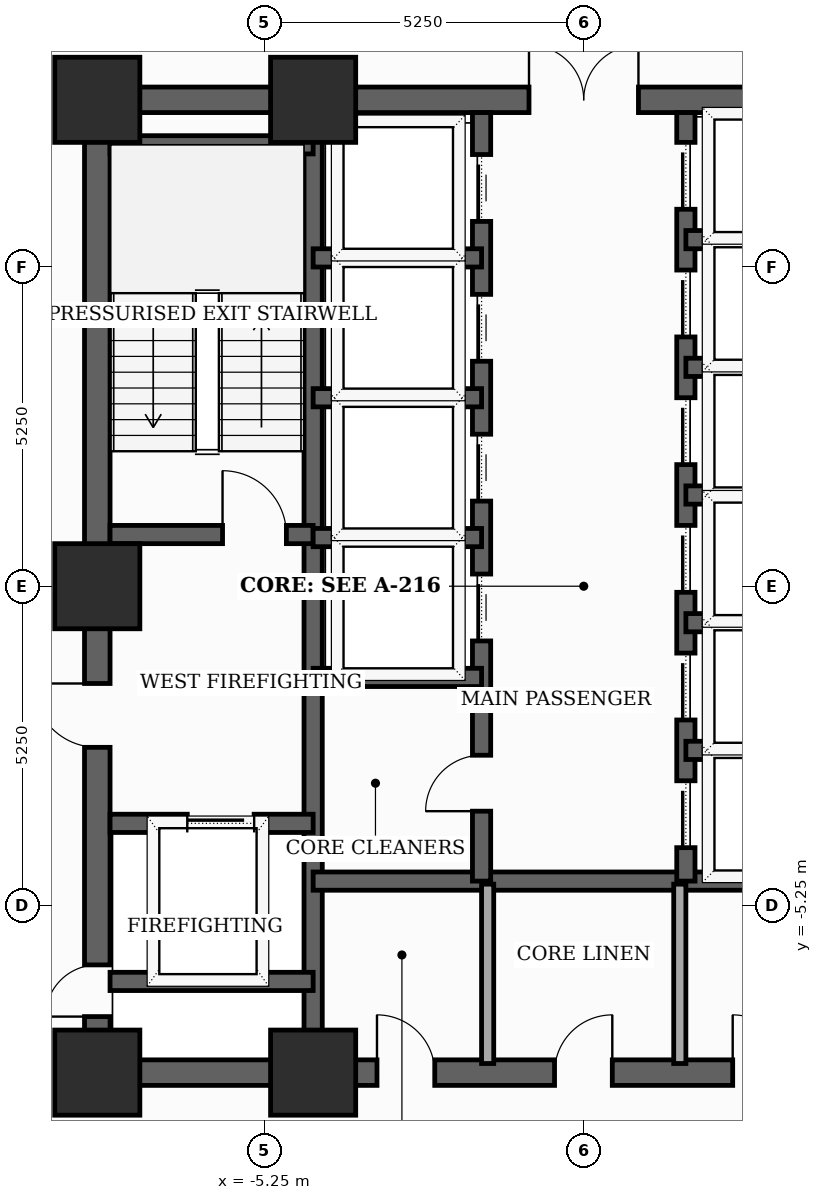
"""IFC4 building model, lengths in metres.
Left out: names, types, materials, properties, quantities, classifications, styles, units other than length and angle.
Written with IfcOpenShell. Run it as: python <this file> out.ifc"""

import sys

from ifc_helpers import new_model, si_unit, direction, frame, frame_2d, origin, origin_2d, place, context, subcontext, project, spatial, rectangle, extrude, element, fill, save


model = new_model("IFC4")
c1 = context("Model", 3, precision=1e-05, world=origin(), true_north=direction((0.0, 1.0)))
c2 = subcontext(c1, "Body", "Model", "MODEL_VIEW")
j1 = project(units=[si_unit("LENGTHUNIT", "METRE"), si_unit("PLANEANGLEUNIT", "RADIAN")], contexts=[c1])
p1 = place(None, origin())
s1 = spatial("IfcSite", under=j1, at=p1, CompositionType="ELEMENT")
p2 = place(p1, origin())
s2 = spatial("IfcBuilding", under=s1, at=p2, CompositionType="ELEMENT")
p3 = place(p2, frame((0.0, 0.0, 105.1)))
s3 = spatial("IfcBuildingStorey", under=s2, at=p3, CompositionType="ELEMENT", Elevation=105.1)
for number, where, z_axis, x_axis in (
    (1, (-8.0, -8.0, 0.0), (0.0, 0.0, 1.0), (1.0, 0.0, 0.0)),
    (2, (-4.45, -8.0, 0.0), (0.0, 0.0, 1.0), (1.0, 0.0, 0.0)),
    (3, (-4.45, 8.0, 0.0), (0.0, 0.0, 1.0), (1.0, 0.0, 0.0)),
    (4, (-8.0, 8.0, 0.0), (0.0, 0.0, 1.0), (1.0, 0.0, 0.0)),
    (5, (-8.0, 0.0, 0.0), (0.0, 0.0, 1.0), (1.0, 0.0, 0.0)),
):
    element("IfcColumn", number, at=place(p3, frame(where, z_axis=z_axis, x_axis=x_axis)), inside=s3, PredefinedType="COLUMN", context=c2, shape_type="SweptSolid", body=[
        extrude(rectangle(XDim=1.4, YDim=1.4, at=origin_2d()), origin(), (0.0, 0.0, 1.0), 3.7),
    ])
p4 = place(p3, frame((-8.0, -8.0, 0.0), z_axis=(0.0, 0.0, 1.0), x_axis=(0.0, 1.0, 0.0)))
e6 = element("IfcWall", 6, at=p4, inside=s3, PredefinedType="SHEAR", context=c2, shape_type="SweptSolid", body=[
    extrude(rectangle(XDim=16.0, YDim=0.42, at=frame_2d((8.0, 0.0))), origin(), (0.0, 0.0, 1.0), 3.5),
])
p5 = place(p4, frame((0.922, 0.0, 0.0)))
e7 = element("IfcOpeningElement", 7, at=p5, cuts=e6, PredefinedType="OPENING", context=c2, shape_type="SweptSolid", body=[
    extrude(rectangle(XDim=0.85, YDim=2.02, at=frame_2d((0.425, 1.01))), frame((0.0, 0.22, 0.0), z_axis=(0.0, -1.0, 0.0), x_axis=(1.0, 0.0, 0.0)), (0.0, 0.0, 1.0), 0.44),
])
p6 = place(p4, frame((5.35, 0.0, 0.0)))
e8 = element("IfcOpeningElement", 8, at=p6, cuts=e6, PredefinedType="OPENING", context=c2, shape_type="SweptSolid", body=[
    extrude(rectangle(XDim=1.05, YDim=2.15, at=frame_2d((0.525, 1.075))), frame((0.0, 0.22, 0.0), z_axis=(0.0, -1.0, 0.0), x_axis=(1.0, 0.0, 0.0)), (0.0, 0.0, 1.0), 0.44),
])
p7 = place(p3, frame((-8.0, -8.0, 0.0), z_axis=(0.0, 0.0, 1.0), x_axis=(1.0, 0.0, 0.0)))
e9 = element("IfcWall", 9, at=p7, inside=s3, PredefinedType="SHEAR", context=c2, shape_type="SweptSolid", body=[
    extrude(rectangle(XDim=16.0, YDim=0.42, at=frame_2d((8.0, 0.0))), origin(), (0.0, 0.0, 1.0), 3.5),
])
p8 = place(p7, frame((4.6, 0.0, 0.0)))
e10 = element("IfcOpeningElement", 10, at=p8, cuts=e9, PredefinedType="OPENING", context=c2, shape_type="SweptSolid", body=[
    extrude(rectangle(XDim=0.95, YDim=2.1, at=frame_2d((0.475, 1.05))), frame((0.0, 0.22, 0.0), z_axis=(0.0, -1.0, 0.0), x_axis=(1.0, 0.0, 0.0)), (0.0, 0.0, 1.0), 0.44),
])
p9 = place(p7, frame((7.52, 0.0, 0.0)))
e11 = element("IfcOpeningElement", 11, at=p9, cuts=e9, PredefinedType="OPENING", context=c2, shape_type="SweptSolid", body=[
    extrude(rectangle(XDim=0.95, YDim=2.1, at=frame_2d((0.475, 1.05))), frame((0.0, 0.22, 0.0), z_axis=(0.0, -1.0, 0.0), x_axis=(1.0, 0.0, 0.0)), (0.0, 0.0, 1.0), 0.44),
])
p10 = place(p7, frame((10.45, 0.0, 0.0)))
e12 = element("IfcOpeningElement", 12, at=p10, cuts=e9, PredefinedType="OPENING", context=c2, shape_type="SweptSolid", body=[
    extrude(rectangle(XDim=0.95, YDim=2.1, at=frame_2d((0.475, 1.05))), frame((0.0, 0.22, 0.0), z_axis=(0.0, -1.0, 0.0), x_axis=(1.0, 0.0, 0.0)), (0.0, 0.0, 1.0), 0.44),
])
p11 = place(p3, frame((-8.0, 8.0, 0.0), z_axis=(0.0, 0.0, 1.0), x_axis=(1.0, 0.0, 0.0)))
e13 = element("IfcWall", 13, at=p11, inside=s3, PredefinedType="SHEAR", context=c2, shape_type="SweptSolid", body=[
    extrude(rectangle(XDim=16.0, YDim=0.42, at=frame_2d((8.0, 0.0))), origin(), (0.0, 0.0, 1.0), 3.5),
])
p12 = place(p11, frame((7.1, 0.0, 0.0)))
e14 = element("IfcOpeningElement", 14, at=p12, cuts=e13, PredefinedType="OPENING", context=c2, shape_type="SweptSolid", body=[
    extrude(rectangle(XDim=1.8, YDim=2.15, at=frame_2d((0.9, 1.075))), frame((0.0, 0.22, 0.0), z_axis=(0.0, -1.0, 0.0), x_axis=(1.0, 0.0, 0.0)), (0.0, 0.0, 1.0), 0.44),
])
p13 = place(p3, frame((-4.45, -7.79, 0.0), z_axis=(0.0, 0.0, 1.0), x_axis=(0.0, 1.0, 0.0)))
e15 = element("IfcWall", 15, at=p13, inside=s3, PredefinedType="SHEAR", context=c2, shape_type="SweptSolid", body=[
    extrude(rectangle(XDim=15.58, YDim=0.3, at=frame_2d((7.79, 0.0))), origin(), (0.0, 0.0, 1.0), 3.5),
])
p14 = place(p3, frame((-7.79, 0.85, 0.0), z_axis=(0.0, 0.0, 1.0), x_axis=(1.0, 0.0, 0.0)))
e16 = element("IfcWall", 16, at=p14, inside=s3, PredefinedType="SHEAR", context=c2, shape_type="SweptSolid", body=[
    extrude(rectangle(XDim=3.34, YDim=0.3, at=frame_2d((1.67, 0.0))), origin(), (0.0, 0.0, 1.0), 3.5),
])
p15 = place(p14, frame((1.85, 0.0, 0.0)))
e17 = element("IfcOpeningElement", 17, at=p15, cuts=e16, PredefinedType="OPENING", context=c2, shape_type="SweptSolid", body=[
    extrude(rectangle(XDim=1.05, YDim=2.15, at=frame_2d((0.525, 1.075))), frame((0.0, 0.16, 0.0), z_axis=(0.0, -1.0, 0.0), x_axis=(1.0, 0.0, 0.0)), (0.0, 0.0, 1.0), 0.32),
])
p16 = place(p3, frame((-7.79, 7.26, 0.0), z_axis=(0.0, 0.0, 1.0), x_axis=(1.0, 0.0, 0.0)))
e18 = element("IfcWall", 18, at=p16, inside=s3, PredefinedType="SHEAR", context=c2, shape_type="SweptSolid", body=[
    extrude(rectangle(XDim=3.34, YDim=0.3, at=frame_2d((1.67, 0.0))), origin(), (0.0, 0.0, 1.0), 3.5),
])
p17 = place(p3, frame((-7.79, -3.9, 0.0), z_axis=(0.0, 0.0, 1.0), x_axis=(1.0, 0.0, 0.0)))
e19 = element("IfcWall", 19, at=p17, inside=s3, PredefinedType="SHEAR", context=c2, shape_type="SweptSolid", body=[
    extrude(rectangle(XDim=3.34, YDim=0.3, at=frame_2d((1.67, 0.0))), origin(), (0.0, 0.0, 1.0), 3.5),
])
p18 = place(p17, frame((1.27, 0.0, 0.0)))
e20 = element("IfcOpeningElement", 20, at=p18, cuts=e19, PredefinedType="OPENING", context=c2, shape_type="SweptSolid", body=[
    extrude(rectangle(XDim=1.1, YDim=2.1, at=frame_2d((0.55, 1.05))), frame((0.0, 0.16, 0.0), z_axis=(0.0, -1.0, 0.0), x_axis=(1.0, 0.0, 0.0)), (0.0, 0.0, 1.0), 0.32),
])
p19 = place(p3, frame((-7.79, -6.5, 0.0), z_axis=(0.0, 0.0, 1.0), x_axis=(1.0, 0.0, 0.0)))
e21 = element("IfcWall", 21, at=p19, inside=s3, PredefinedType="SHEAR", context=c2, shape_type="SweptSolid", body=[
    extrude(rectangle(XDim=3.34, YDim=0.3, at=frame_2d((1.67, 0.0))), origin(), (0.0, 0.0, 1.0), 3.5),
])
p20 = place(p3, frame((-4.45, -4.85, 0.0), z_axis=(0.0, 0.0, 1.0), x_axis=(1.0, 0.0, 0.0)))
e22 = element("IfcWall", 22, at=p20, inside=s3, PredefinedType="SHEAR", context=c2, shape_type="SweptSolid", body=[
    extrude(rectangle(XDim=8.9, YDim=0.3, at=frame_2d((4.45, 0.0))), origin(), (0.0, 0.0, 1.0), 3.5),
])
p21 = place(p3, frame((-1.68, -4.85, 0.0), z_axis=(0.0, 0.0, 1.0), x_axis=(0.0, 1.0, 0.0)))
e23 = element("IfcWall", 23, at=p21, inside=s3, PredefinedType="SHEAR", context=c2, shape_type="SweptSolid", body=[
    extrude(rectangle(XDim=12.64, YDim=0.3, at=frame_2d((6.32, 0.0))), origin(), (0.0, 0.0, 1.0), 3.5),
])
p22 = place(p21, frame((3.95, 0.0, 0.0)))
e24 = element("IfcOpeningElement", 24, at=p22, cuts=e23, PredefinedType="OPENING", context=c2, shape_type="SweptSolid", body=[
    extrude(rectangle(XDim=1.1, YDim=2.1, at=frame_2d((0.55, 1.05))), frame((0.0, 0.16, 0.0), z_axis=(0.0, -1.0, 0.0), x_axis=(1.0, 0.0, 0.0)), (0.0, 0.0, 1.0), 0.32),
])
p23 = place(p21, frame((6.25, 0.0, 0.0)))
e25 = element("IfcOpeningElement", 25, at=p23, cuts=e23, PredefinedType="OPENING", context=c2, shape_type="SweptSolid", body=[
    extrude(rectangle(XDim=1.1, YDim=2.1, at=frame_2d((0.55, 1.05))), frame((0.0, 0.16, 0.0), z_axis=(0.0, -1.0, 0.0), x_axis=(1.0, 0.0, 0.0)), (0.0, 0.0, 1.0), 0.32),
])
p24 = place(p21, frame((8.55, 0.0, 0.0)))
e26 = element("IfcOpeningElement", 26, at=p24, cuts=e23, PredefinedType="OPENING", context=c2, shape_type="SweptSolid", body=[
    extrude(rectangle(XDim=1.1, YDim=2.1, at=frame_2d((0.55, 1.05))), frame((0.0, 0.16, 0.0), z_axis=(0.0, -1.0, 0.0), x_axis=(1.0, 0.0, 0.0)), (0.0, 0.0, 1.0), 0.32),
])
p25 = place(p21, frame((10.85, 0.0, 0.0)))
e27 = element("IfcOpeningElement", 27, at=p25, cuts=e23, PredefinedType="OPENING", context=c2, shape_type="SweptSolid", body=[
    extrude(rectangle(XDim=1.1, YDim=2.1, at=frame_2d((0.55, 1.05))), frame((0.0, 0.16, 0.0), z_axis=(0.0, -1.0, 0.0), x_axis=(1.0, 0.0, 0.0)), (0.0, 0.0, 1.0), 0.32),
])
p26 = place(p21, frame((1.15, 0.0, 0.0)))
e28 = element("IfcOpeningElement", 28, at=p26, cuts=e23, PredefinedType="OPENING", context=c2, shape_type="SweptSolid", body=[
    extrude(rectangle(XDim=0.92, YDim=2.1, at=frame_2d((0.46, 1.05))), frame((0.0, 0.16, 0.0), z_axis=(0.0, -1.0, 0.0), x_axis=(1.0, 0.0, 0.0)), (0.0, 0.0, 1.0), 0.32),
])
p27 = place(p3, frame((1.68, -4.85, 0.0), z_axis=(0.0, 0.0, 1.0), x_axis=(0.0, 1.0, 0.0)))
e29 = element("IfcWall", 29, at=p27, inside=s3, PredefinedType="SHEAR", context=c2, shape_type="SweptSolid", body=[
    extrude(rectangle(XDim=12.64, YDim=0.3, at=frame_2d((6.32, 0.0))), origin(), (0.0, 0.0, 1.0), 3.5),
])
p28 = place(p27, frame((0.55, 0.0, 0.0)))
e30 = element("IfcOpeningElement", 30, at=p28, cuts=e29, PredefinedType="OPENING", context=c2, shape_type="SweptSolid", body=[
    extrude(rectangle(XDim=1.1, YDim=2.1, at=frame_2d((0.55, 1.05))), frame((0.0, 0.16, 0.0), z_axis=(0.0, -1.0, 0.0), x_axis=(1.0, 0.0, 0.0)), (0.0, 0.0, 1.0), 0.32),
])
p29 = place(p27, frame((2.65, 0.0, 0.0)))
e31 = element("IfcOpeningElement", 31, at=p29, cuts=e29, PredefinedType="OPENING", context=c2, shape_type="SweptSolid", body=[
    extrude(rectangle(XDim=1.1, YDim=2.1, at=frame_2d((0.55, 1.05))), frame((0.0, 0.16, 0.0), z_axis=(0.0, -1.0, 0.0), x_axis=(1.0, 0.0, 0.0)), (0.0, 0.0, 1.0), 0.32),
])
p30 = place(p27, frame((4.75, 0.0, 0.0)))
e32 = element("IfcOpeningElement", 32, at=p30, cuts=e29, PredefinedType="OPENING", context=c2, shape_type="SweptSolid", body=[
    extrude(rectangle(XDim=1.1, YDim=2.1, at=frame_2d((0.55, 1.05))), frame((0.0, 0.16, 0.0), z_axis=(0.0, -1.0, 0.0), x_axis=(1.0, 0.0, 0.0)), (0.0, 0.0, 1.0), 0.32),
])
p31 = place(p27, frame((6.85, 0.0, 0.0)))
e33 = element("IfcOpeningElement", 33, at=p31, cuts=e29, PredefinedType="OPENING", context=c2, shape_type="SweptSolid", body=[
    extrude(rectangle(XDim=1.1, YDim=2.1, at=frame_2d((0.55, 1.05))), frame((0.0, 0.16, 0.0), z_axis=(0.0, -1.0, 0.0), x_axis=(1.0, 0.0, 0.0)), (0.0, 0.0, 1.0), 0.32),
])
p32 = place(p27, frame((8.95, 0.0, 0.0)))
e34 = element("IfcOpeningElement", 34, at=p32, cuts=e29, PredefinedType="OPENING", context=c2, shape_type="SweptSolid", body=[
    extrude(rectangle(XDim=1.1, YDim=2.1, at=frame_2d((0.55, 1.05))), frame((0.0, 0.16, 0.0), z_axis=(0.0, -1.0, 0.0), x_axis=(1.0, 0.0, 0.0)), (0.0, 0.0, 1.0), 0.32),
])
p33 = place(p27, frame((11.05, 0.0, 0.0)))
e35 = element("IfcOpeningElement", 35, at=p33, cuts=e29, PredefinedType="OPENING", context=c2, shape_type="SweptSolid", body=[
    extrude(rectangle(XDim=1.1, YDim=2.1, at=frame_2d((0.55, 1.05))), frame((0.0, 0.16, 0.0), z_axis=(0.0, -1.0, 0.0), x_axis=(1.0, 0.0, 0.0)), (0.0, 0.0, 1.0), 0.32),
])
for number, where, z_axis, x_axis in (
    (36, (-4.45, -1.5, 0.0), (0.0, 0.0, 1.0), (1.0, 0.0, 0.0)),
    (37, (-4.45, 0.8, 0.0), (0.0, 0.0, 1.0), (1.0, 0.0, 0.0)),
    (38, (-4.45, 3.1, 0.0), (0.0, 0.0, 1.0), (1.0, 0.0, 0.0)),
    (39, (-4.45, 5.4, 0.0), (0.0, 0.0, 1.0), (1.0, 0.0, 0.0)),
    (40, (1.68, 1.5, 0.0), (0.0, 0.0, 1.0), (1.0, 0.0, 0.0)),
    (41, (1.68, 3.6, 0.0), (0.0, 0.0, 1.0), (1.0, 0.0, 0.0)),
    (42, (1.68, 5.7, 0.0), (0.0, 0.0, 1.0), (1.0, 0.0, 0.0)),
    (43, (1.68, -2.7, 0.0), (0.0, 0.0, 1.0), (1.0, 0.0, 0.0)),
    (44, (1.68, -0.6, 0.0), (0.0, 0.0, 1.0), (1.0, 0.0, 0.0)),
):
    element("IfcWall", number, at=place(p3, frame(where, z_axis=z_axis, x_axis=x_axis)), inside=s3, PredefinedType="SHEAR", context=c2, shape_type="SweptSolid", body=[
        extrude(rectangle(XDim=2.77, YDim=0.3, at=frame_2d((1.385, 0.0))), origin(), (0.0, 0.0, 1.0), 3.5),
    ])
for number, where, z_axis, x_axis in (
    (45, (-1.58, -7.85, 0.0), (0.0, 0.0, 1.0), (0.0, 1.0, 0.0)),
    (46, (1.58, -7.85, 0.0), (0.0, 0.0, 1.0), (0.0, 1.0, 0.0)),
):
    element("IfcWall", number, at=place(p3, frame(where, z_axis=z_axis, x_axis=x_axis)), inside=s3, PredefinedType="SOLIDWALL", context=c2, shape_type="SweptSolid", body=[
        extrude(rectangle(XDim=2.95, YDim=0.2, at=frame_2d((1.475, 0.0))), origin(), (0.0, 0.0, 1.0), 2.885),
    ])
p34 = place(p5, origin())
e47 = element("IfcDoor", 47, at=p34, inside=s3, OperationType="SINGLE_SWING_LEFT", PredefinedType="TRAPDOOR", context=c2, shape_type="SweptSolid", body=[
    extrude(rectangle(XDim=0.85, YDim=2.02, at=frame_2d((0.425, 1.01))), frame((0.0, 0.025, 0.0), z_axis=(0.0, -1.0, 0.0), x_axis=(1.0, 0.0, 0.0)), (0.0, 0.0, 1.0), 0.05),
])
fill(e7, e47)
p35 = place(p6, origin())
e48 = element("IfcDoor", 48, at=p35, inside=s3, OperationType="SINGLE_SWING_RIGHT", PredefinedType="DOOR", context=c2, shape_type="SweptSolid", body=[
    extrude(rectangle(XDim=1.05, YDim=2.15, at=frame_2d((0.525, 1.075))), frame((0.0, 0.025, 0.0), z_axis=(0.0, -1.0, 0.0), x_axis=(1.0, 0.0, 0.0)), (0.0, 0.0, 1.0), 0.05),
])
fill(e8, e48)
p36 = place(p8, origin())
e49 = element("IfcDoor", 49, at=p36, inside=s3, OperationType="SINGLE_SWING_LEFT", PredefinedType="DOOR", context=c2, shape_type="SweptSolid", body=[
    extrude(rectangle(XDim=0.95, YDim=2.1, at=frame_2d((0.475, 1.05))), frame((0.0, 0.025, 0.0), z_axis=(0.0, -1.0, 0.0), x_axis=(1.0, 0.0, 0.0)), (0.0, 0.0, 1.0), 0.05),
])
fill(e10, e49)
p37 = place(p9, origin())
e50 = element("IfcDoor", 50, at=p37, inside=s3, OperationType="SINGLE_SWING_RIGHT", PredefinedType="DOOR", context=c2, shape_type="SweptSolid", body=[
    extrude(rectangle(XDim=0.95, YDim=2.1, at=frame_2d((0.475, 1.05))), frame((0.0, 0.025, 0.0), z_axis=(0.0, -1.0, 0.0), x_axis=(1.0, 0.0, 0.0)), (0.0, 0.0, 1.0), 0.05),
])
fill(e11, e50)
p38 = place(p10, origin())
e51 = element("IfcDoor", 51, at=p38, inside=s3, OperationType="SINGLE_SWING_LEFT", PredefinedType="DOOR", context=c2, shape_type="SweptSolid", body=[
    extrude(rectangle(XDim=0.95, YDim=2.1, at=frame_2d((0.475, 1.05))), frame((0.0, 0.025, 0.0), z_axis=(0.0, -1.0, 0.0), x_axis=(1.0, 0.0, 0.0)), (0.0, 0.0, 1.0), 0.05),
])
fill(e12, e51)
p39 = place(p12, origin())
e52 = element("IfcDoor", 52, at=p39, inside=s3, OperationType="DOUBLE_DOOR_SINGLE_SWING", PredefinedType="DOOR", context=c2, shape_type="SweptSolid", body=[
    extrude(rectangle(XDim=1.8, YDim=2.15, at=frame_2d((0.9, 1.075))), frame((0.0, 0.025, 0.0), z_axis=(0.0, -1.0, 0.0), x_axis=(1.0, 0.0, 0.0)), (0.0, 0.0, 1.0), 0.05),
])
fill(e14, e52)
p40 = place(p15, origin())
e53 = element("IfcDoor", 53, at=p40, inside=s3, OperationType="SINGLE_SWING_LEFT", PredefinedType="DOOR", context=c2, shape_type="SweptSolid", body=[
    extrude(rectangle(XDim=1.05, YDim=2.15, at=frame_2d((0.525, 1.075))), frame((0.0, 0.025, 0.0), z_axis=(0.0, -1.0, 0.0), x_axis=(1.0, 0.0, 0.0)), (0.0, 0.0, 1.0), 0.05),
])
fill(e17, e53)
p41 = place(p18, origin())
e54 = element("IfcDoor", 54, at=p41, inside=s3, OperationType="SLIDING_TO_LEFT", PredefinedType="DOOR", context=c2, shape_type="SweptSolid", body=[
    extrude(rectangle(XDim=1.1, YDim=2.1, at=frame_2d((0.55, 1.05))), frame((0.0, 0.025, 0.0), z_axis=(0.0, -1.0, 0.0), x_axis=(1.0, 0.0, 0.0)), (0.0, 0.0, 1.0), 0.05),
])
fill(e20, e54)
p42 = place(p22, origin())
e55 = element("IfcDoor", 55, at=p42, inside=s3, OperationType="SLIDING_TO_LEFT", PredefinedType="DOOR", context=c2, shape_type="SweptSolid", body=[
    extrude(rectangle(XDim=1.1, YDim=2.1, at=frame_2d((0.55, 1.05))), frame((0.0, 0.025, 0.0), z_axis=(0.0, -1.0, 0.0), x_axis=(1.0, 0.0, 0.0)), (0.0, 0.0, 1.0), 0.05),
])
fill(e24, e55)
p43 = place(p23, origin())
e56 = element("IfcDoor", 56, at=p43, inside=s3, OperationType="SLIDING_TO_LEFT", PredefinedType="DOOR", context=c2, shape_type="SweptSolid", body=[
    extrude(rectangle(XDim=1.1, YDim=2.1, at=frame_2d((0.55, 1.05))), frame((0.0, 0.025, 0.0), z_axis=(0.0, -1.0, 0.0), x_axis=(1.0, 0.0, 0.0)), (0.0, 0.0, 1.0), 0.05),
])
fill(e25, e56)
p44 = place(p24, origin())
e57 = element("IfcDoor", 57, at=p44, inside=s3, OperationType="SLIDING_TO_LEFT", PredefinedType="DOOR", context=c2, shape_type="SweptSolid", body=[
    extrude(rectangle(XDim=1.1, YDim=2.1, at=frame_2d((0.55, 1.05))), frame((0.0, 0.025, 0.0), z_axis=(0.0, -1.0, 0.0), x_axis=(1.0, 0.0, 0.0)), (0.0, 0.0, 1.0), 0.05),
])
fill(e26, e57)
p45 = place(p25, origin())
e58 = element("IfcDoor", 58, at=p45, inside=s3, OperationType="SLIDING_TO_LEFT", PredefinedType="DOOR", context=c2, shape_type="SweptSolid", body=[
    extrude(rectangle(XDim=1.1, YDim=2.1, at=frame_2d((0.55, 1.05))), frame((0.0, 0.025, 0.0), z_axis=(0.0, -1.0, 0.0), x_axis=(1.0, 0.0, 0.0)), (0.0, 0.0, 1.0), 0.05),
])
fill(e27, e58)
p46 = place(p26, origin())
e59 = element("IfcDoor", 59, at=p46, inside=s3, OperationType="SINGLE_SWING_LEFT", PredefinedType="DOOR", context=c2, shape_type="SweptSolid", body=[
    extrude(rectangle(XDim=0.92, YDim=2.1, at=frame_2d((0.46, 1.05))), frame((0.0, 0.025, 0.0), z_axis=(0.0, -1.0, 0.0), x_axis=(1.0, 0.0, 0.0)), (0.0, 0.0, 1.0), 0.05),
])
fill(e28, e59)
p47 = place(p28, origin())
e60 = element("IfcDoor", 60, at=p47, inside=s3, OperationType="SLIDING_TO_LEFT", PredefinedType="DOOR", context=c2, shape_type="SweptSolid", body=[
    extrude(rectangle(XDim=1.1, YDim=2.1, at=frame_2d((0.55, 1.05))), frame((0.0, 0.025, 0.0), z_axis=(0.0, -1.0, 0.0), x_axis=(1.0, 0.0, 0.0)), (0.0, 0.0, 1.0), 0.05),
])
fill(e30, e60)
p48 = place(p29, origin())
e61 = element("IfcDoor", 61, at=p48, inside=s3, OperationType="SLIDING_TO_LEFT", PredefinedType="DOOR", context=c2, shape_type="SweptSolid", body=[
    extrude(rectangle(XDim=1.1, YDim=2.1, at=frame_2d((0.55, 1.05))), frame((0.0, 0.025, 0.0), z_axis=(0.0, -1.0, 0.0), x_axis=(1.0, 0.0, 0.0)), (0.0, 0.0, 1.0), 0.05),
])
fill(e31, e61)
p49 = place(p30, origin())
e62 = element("IfcDoor", 62, at=p49, inside=s3, OperationType="SLIDING_TO_LEFT", PredefinedType="DOOR", context=c2, shape_type="SweptSolid", body=[
    extrude(rectangle(XDim=1.1, YDim=2.1, at=frame_2d((0.55, 1.05))), frame((0.0, 0.025, 0.0), z_axis=(0.0, -1.0, 0.0), x_axis=(1.0, 0.0, 0.0)), (0.0, 0.0, 1.0), 0.05),
])
fill(e32, e62)
p50 = place(p31, origin())
e63 = element("IfcDoor", 63, at=p50, inside=s3, OperationType="SLIDING_TO_LEFT", PredefinedType="DOOR", context=c2, shape_type="SweptSolid", body=[
    extrude(rectangle(XDim=1.1, YDim=2.1, at=frame_2d((0.55, 1.05))), frame((0.0, 0.025, 0.0), z_axis=(0.0, -1.0, 0.0), x_axis=(1.0, 0.0, 0.0)), (0.0, 0.0, 1.0), 0.05),
])
fill(e33, e63)
p51 = place(p32, origin())
e64 = element("IfcDoor", 64, at=p51, inside=s3, OperationType="SLIDING_TO_LEFT", PredefinedType="DOOR", context=c2, shape_type="SweptSolid", body=[
    extrude(rectangle(XDim=1.1, YDim=2.1, at=frame_2d((0.55, 1.05))), frame((0.0, 0.025, 0.0), z_axis=(0.0, -1.0, 0.0), x_axis=(1.0, 0.0, 0.0)), (0.0, 0.0, 1.0), 0.05),
])
fill(e34, e64)
p52 = place(p33, origin())
e65 = element("IfcDoor", 65, at=p52, inside=s3, OperationType="SLIDING_TO_LEFT", PredefinedType="DOOR", context=c2, shape_type="SweptSolid", body=[
    extrude(rectangle(XDim=1.1, YDim=2.1, at=frame_2d((0.55, 1.05))), frame((0.0, 0.025, 0.0), z_axis=(0.0, -1.0, 0.0), x_axis=(1.0, 0.0, 0.0)), (0.0, 0.0, 1.0), 0.05),
])
fill(e35, e65)
save(model, sys.argv[1])
